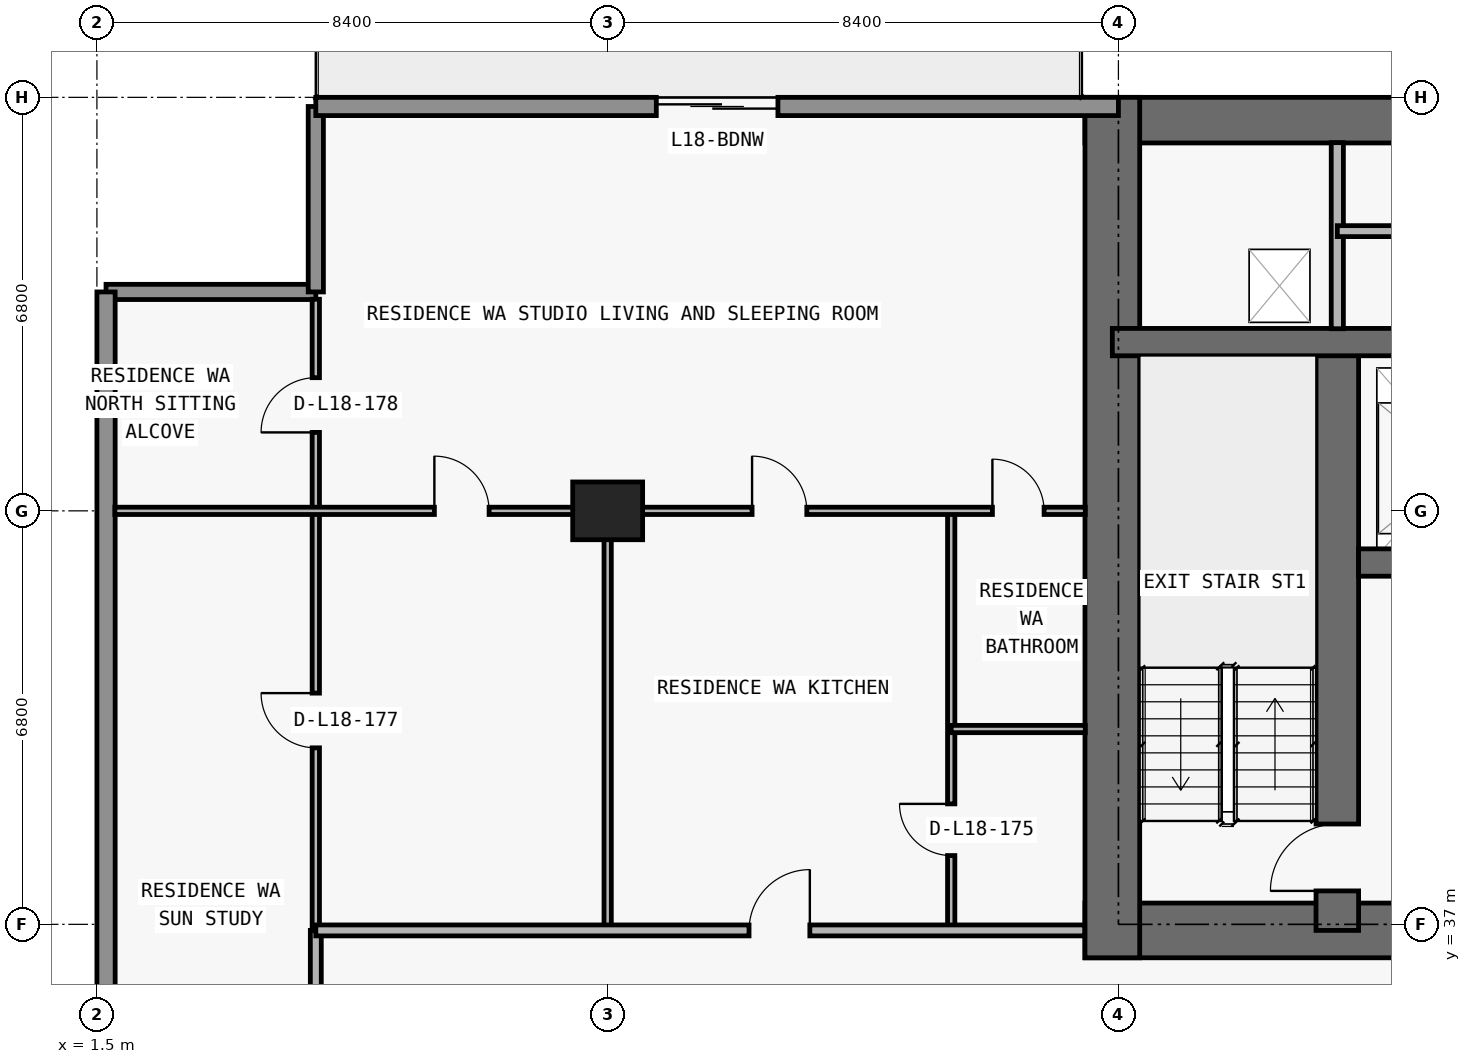
"""IFC4 building model, lengths in metres.
Left out: names, types, materials, properties, quantities, classifications, styles, units other than length and angle.
Written with IfcOpenShell. Run it as: python <this file> out.ifc"""

import sys

from ifc_helpers import new_model, si_unit, direction, frame, frame_2d, origin, origin_2d, place, context, subcontext, project, spatial, rectangle, extrude, element, fill, save


model = new_model("IFC4")
c1 = context("Model", 3, precision=1e-05, world=origin(), true_north=direction((0.0, 1.0)))
c2 = subcontext(c1, "Body", "Model", "MODEL_VIEW")
j1 = project(units=[si_unit("LENGTHUNIT", "METRE"), si_unit("PLANEANGLEUNIT", "RADIAN")], contexts=[c1])
p1 = place(None, origin())
s1 = spatial("IfcSite", under=j1, at=p1, CompositionType="ELEMENT")
p2 = place(p1, origin())
s2 = spatial("IfcBuilding", under=s1, at=p2, CompositionType="ELEMENT")
p3 = place(p2, frame((0.0, 0.0, 69.6)))
s3 = spatial("IfcBuildingStorey", under=s2, at=p3, CompositionType="ELEMENT", Elevation=69.6)
p4 = place(p3, frame((9.9, 43.8, 0.0), z_axis=(0.0, 0.0, 1.0), x_axis=(1.0, 0.0, 0.0)))
e1 = element("IfcColumn", 1, at=p4, inside=s3, PredefinedType="COLUMN", context=c2, shape_type="SweptSolid", body=[
    extrude(rectangle(XDim=1.15, YDim=0.95, at=origin_2d()), origin(), (0.0, 0.0, 1.0), 3.05),
])
p5 = place(p3, frame((17.75, 36.9, 0.0), z_axis=(0.0, 0.0, 1.0), x_axis=(1.0, 0.0, 0.0)))
e2 = element("IfcWall", 2, at=p5, inside=s3, PredefinedType="SHEAR", context=c2, shape_type="SweptSolid", body=[
    extrude(rectangle(XDim=42.3, YDim=0.9, at=frame_2d((21.15, 0.0))), origin(), (0.0, 0.0, 1.0), 3.05),
])
p6 = place(p5, frame((14.55, 0.0, 0.0)))
e3 = element("IfcOpeningElement", 3, at=p6, cuts=e2, PredefinedType="OPENING", context=c2, shape_type="SweptSolid", body=[
    extrude(rectangle(XDim=1.1, YDim=2.15, at=frame_2d((0.55, 1.075))), frame((0.0, 0.46, 0.0), z_axis=(0.0, -1.0, 0.0), x_axis=(1.0, 0.0, 0.0)), (0.0, 0.0, 1.0), 0.92),
])
p7 = place(p5, frame((6.4, 0.0, 0.0)))
e4 = element("IfcOpeningElement", 4, at=p7, cuts=e2, PredefinedType="OPENING", context=c2, shape_type="SweptSolid", body=[
    extrude(rectangle(XDim=1.05, YDim=2.15, at=frame_2d((0.525, 1.075))), frame((0.0, 0.46, 0.0), z_axis=(0.0, -1.0, 0.0), x_axis=(1.0, 0.0, 0.0)), (0.0, 0.0, 1.0), 0.92),
])
p8 = place(p5, frame((34.9, 0.0, 0.0)))
e5 = element("IfcOpeningElement", 5, at=p8, cuts=e2, PredefinedType="OPENING", context=c2, shape_type="SweptSolid", body=[
    extrude(rectangle(XDim=1.05, YDim=2.15, at=frame_2d((0.525, 1.075))), frame((0.0, 0.46, 0.0), z_axis=(0.0, -1.0, 0.0), x_axis=(1.0, 0.0, 0.0)), (0.0, 0.0, 1.0), 0.92),
])
p9 = place(p5, frame((11.012, 0.0, 0.0)))
e6 = element("IfcOpeningElement", 6, at=p9, cuts=e2, PredefinedType="OPENING", context=c2, shape_type="SweptSolid", body=[
    extrude(rectangle(XDim=1.05, YDim=2.15, at=frame_2d((0.525, 1.075))), frame((0.0, 0.46, 0.0), z_axis=(0.0, -1.0, 0.0), x_axis=(1.0, 0.0, 0.0)), (0.0, 0.0, 1.0), 0.92),
])
p10 = place(p5, frame((24.25, 0.0, 0.0)))
e7 = element("IfcOpeningElement", 7, at=p10, cuts=e2, PredefinedType="OPENING", context=c2, shape_type="SweptSolid", body=[
    extrude(rectangle(XDim=1.05, YDim=2.15, at=frame_2d((0.525, 1.075))), frame((0.0, 0.46, 0.0), z_axis=(0.0, -1.0, 0.0), x_axis=(1.0, 0.0, 0.0)), (0.0, 0.0, 1.0), 0.92),
])
p11 = place(p3, frame((17.75, 50.225, 0.0), z_axis=(0.0, 0.0, 1.0), x_axis=(1.0, 0.0, 0.0)))
e8 = element("IfcWall", 8, at=p11, inside=s3, PredefinedType="SHEAR", context=c2, shape_type="SweptSolid", body=[
    extrude(rectangle(XDim=42.3, YDim=0.75, at=frame_2d((21.15, 0.0))), origin(), (0.0, 0.0, 1.0), 3.05),
])
p12 = place(p3, frame((18.2, 36.45, 0.0), z_axis=(0.0, 0.0, 1.0), x_axis=(0.0, 1.0, 0.0)))
e9 = element("IfcWall", 9, at=p12, inside=s3, PredefinedType="SHEAR", context=c2, shape_type="SweptSolid", body=[
    extrude(rectangle(XDim=14.15, YDim=0.9, at=frame_2d((7.075, 0.0))), origin(), (0.0, 0.0, 1.0), 3.05),
])
p13 = place(p3, frame((21.9, 36.9, 0.0), z_axis=(0.0, 0.0, 1.0), x_axis=(0.0, 1.0, 0.0)))
e10 = element("IfcWall", 10, at=p13, inside=s3, PredefinedType="SHEAR", context=c2, shape_type="SweptSolid", body=[
    extrude(rectangle(XDim=9.675, YDim=0.7, at=frame_2d((4.837, 0.0))), origin(), (0.0, 0.0, 1.0), 3.05),
])
p14 = place(p13, frame((0.65, 0.0, 0.0)))
e11 = element("IfcOpeningElement", 11, at=p14, cuts=e10, PredefinedType="OPENING", context=c2, shape_type="SweptSolid", body=[
    extrude(rectangle(XDim=1.1, YDim=2.15, at=frame_2d((0.55, 1.075))), frame((0.0, 0.36, 0.0), z_axis=(0.0, -1.0, 0.0), x_axis=(1.0, 0.0, 0.0)), (0.0, 0.0, 1.0), 0.72),
])
p15 = place(p3, frame((22.25, 42.95, 0.0), z_axis=(0.0, 0.0, 1.0), x_axis=(1.0, 0.0, 0.0)))
e12 = element("IfcWall", 12, at=p15, inside=s3, PredefinedType="SHEAR", context=c2, shape_type="SweptSolid", body=[
    extrude(rectangle(XDim=33.3, YDim=0.45, at=frame_2d((16.65, 0.0))), origin(), (0.0, 0.0, 1.0), 3.05),
])
p16 = place(p15, frame((1.05, 0.0, 0.0)))
e13 = element("IfcOpeningElement", 13, at=p16, cuts=e12, PredefinedType="OPENING", context=c2, shape_type="SweptSolid", body=[
    extrude(rectangle(XDim=1.2, YDim=2.2, at=frame_2d((0.6, 1.1))), frame((0.0, 0.235, 0.0), z_axis=(0.0, -1.0, 0.0), x_axis=(1.0, 0.0, 0.0)), (0.0, 0.0, 1.0), 0.47),
])
p17 = place(p15, frame((31.05, 0.0, 0.0)))
e14 = element("IfcOpeningElement", 14, at=p17, cuts=e12, PredefinedType="OPENING", context=c2, shape_type="SweptSolid", body=[
    extrude(rectangle(XDim=1.2, YDim=2.2, at=frame_2d((0.6, 1.1))), frame((0.0, 0.235, 0.0), z_axis=(0.0, -1.0, 0.0), x_axis=(1.0, 0.0, 0.0)), (0.0, 0.0, 1.0), 0.47),
])
p18 = place(p15, frame((13.5, 0.0, 0.0)))
e15 = element("IfcOpeningElement", 15, at=p18, cuts=e12, PredefinedType="OPENING", context=c2, shape_type="SweptSolid", body=[
    extrude(rectangle(XDim=1.1, YDim=2.2, at=frame_2d((0.55, 1.1))), frame((0.0, 0.235, 0.0), z_axis=(0.0, -1.0, 0.0), x_axis=(1.0, 0.0, 0.0)), (0.0, 0.0, 1.0), 0.47),
])
p19 = place(p15, frame((16.1, 0.0, 0.0)))
e16 = element("IfcOpeningElement", 16, at=p19, cuts=e12, PredefinedType="OPENING", context=c2, shape_type="SweptSolid", body=[
    extrude(rectangle(XDim=1.1, YDim=2.2, at=frame_2d((0.55, 1.1))), frame((0.0, 0.235, 0.0), z_axis=(0.0, -1.0, 0.0), x_axis=(1.0, 0.0, 0.0)), (0.0, 0.0, 1.0), 0.47),
])
p20 = place(p15, frame((18.7, 0.0, 0.0)))
e17 = element("IfcOpeningElement", 17, at=p20, cuts=e12, PredefinedType="OPENING", context=c2, shape_type="SweptSolid", body=[
    extrude(rectangle(XDim=1.1, YDim=2.2, at=frame_2d((0.55, 1.1))), frame((0.0, 0.235, 0.0), z_axis=(0.0, -1.0, 0.0), x_axis=(1.0, 0.0, 0.0)), (0.0, 0.0, 1.0), 0.47),
])
p21 = place(p15, frame((3.625, 0.0, 0.0)))
e18 = element("IfcOpeningElement", 18, at=p21, cuts=e12, PredefinedType="OPENING", context=c2, shape_type="SweptSolid", body=[
    extrude(rectangle(XDim=1.05, YDim=2.15, at=frame_2d((0.525, 1.075))), frame((0.0, 0.235, 0.0), z_axis=(0.0, -1.0, 0.0), x_axis=(1.0, 0.0, 0.0)), (0.0, 0.0, 1.0), 0.47),
])
p22 = place(p15, frame((28.675, 0.0, 0.0)))
e19 = element("IfcOpeningElement", 19, at=p22, cuts=e12, PredefinedType="OPENING", context=c2, shape_type="SweptSolid", body=[
    extrude(rectangle(XDim=1.05, YDim=2.15, at=frame_2d((0.525, 1.075))), frame((0.0, 0.235, 0.0), z_axis=(0.0, -1.0, 0.0), x_axis=(1.0, 0.0, 0.0)), (0.0, 0.0, 1.0), 0.47),
])
p23 = place(p3, frame((18.2, 46.575, 0.0), z_axis=(0.0, 0.0, 1.0), x_axis=(1.0, 0.0, 0.0)))
e20 = element("IfcWall", 20, at=p23, inside=s3, PredefinedType="SHEAR", context=c2, shape_type="SweptSolid", body=[
    extrude(rectangle(XDim=41.4, YDim=0.45, at=frame_2d((20.7, 0.0))), origin(), (0.0, 0.0, 1.0), 3.05),
])
p24 = place(p23, frame((7.675, 0.0, 0.0)))
e21 = element("IfcOpeningElement", 21, at=p24, cuts=e20, PredefinedType="OPENING", context=c2, shape_type="SweptSolid", body=[
    extrude(rectangle(XDim=1.05, YDim=2.15, at=frame_2d((0.525, 1.075))), frame((0.0, 0.235, 0.0), z_axis=(0.0, -1.0, 0.0), x_axis=(1.0, 0.0, 0.0)), (0.0, 0.0, 1.0), 0.47),
])
p25 = place(p23, frame((32.725, 0.0, 0.0)))
e22 = element("IfcOpeningElement", 22, at=p25, cuts=e20, PredefinedType="OPENING", context=c2, shape_type="SweptSolid", body=[
    extrude(rectangle(XDim=1.05, YDim=2.15, at=frame_2d((0.525, 1.075))), frame((0.0, 0.235, 0.0), z_axis=(0.0, -1.0, 0.0), x_axis=(1.0, 0.0, 0.0)), (0.0, 0.0, 1.0), 0.47),
])
p26 = place(p3, frame((1.65, 47.4, 0.0), z_axis=(0.0, 0.0, 1.0), x_axis=(1.0, 0.0, 0.0)))
e23 = element("IfcWall", 23, at=p26, inside=s3, PredefinedType="ELEMENTEDWALL", context=c2, shape_type="SweptSolid", body=[
    extrude(rectangle(XDim=3.45, YDim=0.25, at=frame_2d((1.725, 0.0))), origin(), (0.0, 0.0, 1.0), 3.05),
])
p27 = place(p3, frame((5.1, 47.4, 0.0), z_axis=(0.0, 0.0, 1.0), x_axis=(0.0, 1.0, 0.0)))
e24 = element("IfcWall", 24, at=p27, inside=s3, PredefinedType="ELEMENTEDWALL", context=c2, shape_type="SweptSolid", body=[
    extrude(rectangle(XDim=3.05, YDim=0.25, at=frame_2d((1.525, 0.0))), origin(), (0.0, 0.0, 1.0), 3.05),
])
p28 = place(p3, frame((1.65, 26.8, 0.0), z_axis=(0.0, 0.0, 1.0), x_axis=(0.0, 1.0, 0.0)))
e25 = element("IfcWall", 25, at=p28, inside=s3, PredefinedType="STANDARD", context=c2, shape_type="SweptSolid", body=[
    extrude(rectangle(XDim=20.6, YDim=0.3, at=frame_2d((10.3, 0.0))), origin(), (0.0, 0.0, 1.0), 3.05),
])
p29 = place(p3, frame((5.1, 50.45, 0.0), z_axis=(0.0, 0.0, 1.0), x_axis=(1.0, 0.0, 0.0)))
e26 = element("IfcWall", 26, at=p29, inside=s3, PredefinedType="STANDARD", context=c2, shape_type="SweptSolid", body=[
    extrude(rectangle(XDim=13.2, YDim=0.3, at=frame_2d((6.6, 0.0))), origin(), (0.0, 0.0, 1.0), 3.05),
])
p30 = place(p29, frame((5.6, 0.0, 0.0)))
e27 = element("IfcOpeningElement", 27, at=p30, cuts=e26, PredefinedType="OPENING", context=c2, shape_type="SweptSolid", body=[
    extrude(rectangle(XDim=2.0, YDim=2.3, at=frame_2d((1.0, 1.15))), frame((0.0, 0.16, 0.0), z_axis=(0.0, -1.0, 0.0), x_axis=(1.0, 0.0, 0.0)), (0.0, 0.0, 1.0), 0.32),
])
p31 = place(p3, frame((5.1, 34.705, 0.0), z_axis=(0.0, 0.0, 1.0), x_axis=(0.0, 1.0, 0.0)))
e28 = element("IfcWall", 28, at=p31, inside=s3, PredefinedType="PARTITIONING", context=c2, shape_type="SweptSolid", body=[
    extrude(rectangle(XDim=2.195, YDim=0.18, at=frame_2d((1.097, 0.0))), origin(), (0.0, 0.0, 1.0), 3.05),
])
p32 = place(p3, frame((5.1, 36.905, 0.0), z_axis=(0.0, 0.0, 1.0), x_axis=(0.0, 1.0, 0.0)))
e29 = element("IfcWall", 29, at=p32, inside=s3, PredefinedType="PARTITIONING", context=c2, shape_type="SweptSolid", body=[
    extrude(rectangle(XDim=10.375, YDim=0.12, at=frame_2d((5.188, 0.0))), origin(), (0.0, 0.0, 1.0), 3.05),
])
p33 = place(p32, frame((2.998, 0.0, 0.0)))
e30 = element("IfcOpeningElement", 30, at=p33, cuts=e29, PredefinedType="OPENING", context=c2, shape_type="SweptSolid", body=[
    extrude(rectangle(XDim=0.9, YDim=2.15, at=frame_2d((0.45, 1.075))), frame((0.0, 0.07, 0.0), z_axis=(0.0, -1.0, 0.0), x_axis=(1.0, 0.0, 0.0)), (0.0, 0.0, 1.0), 0.14),
])
p34 = place(p32, frame((8.185, 0.0, 0.0)))
e31 = element("IfcOpeningElement", 31, at=p34, cuts=e29, PredefinedType="OPENING", context=c2, shape_type="SweptSolid", body=[
    extrude(rectangle(XDim=0.9, YDim=2.15, at=frame_2d((0.45, 1.075))), frame((0.0, 0.07, 0.0), z_axis=(0.0, -1.0, 0.0), x_axis=(1.0, 0.0, 0.0)), (0.0, 0.0, 1.0), 0.14),
])
p35 = place(p3, frame((9.9, 36.9, 0.0), z_axis=(0.0, 0.0, 1.0), x_axis=(0.0, 1.0, 0.0)))
e32 = element("IfcWall", 32, at=p35, inside=s3, PredefinedType="PARTITIONING", context=c2, shape_type="SweptSolid", body=[
    extrude(rectangle(XDim=6.9, YDim=0.12, at=frame_2d((3.45, 0.0))), origin(), (0.0, 0.0, 1.0), 2.11),
])
p36 = place(p3, frame((15.55, 36.9, 0.0), z_axis=(0.0, 0.0, 1.0), x_axis=(0.0, 1.0, 0.0)))
e33 = element("IfcWall", 33, at=p36, inside=s3, PredefinedType="PARTITIONING", context=c2, shape_type="SweptSolid", body=[
    extrude(rectangle(XDim=6.9, YDim=0.12, at=frame_2d((3.45, 0.0))), origin(), (0.0, 0.0, 1.0), 3.05),
])
p37 = place(p36, frame((1.231, 0.0, 0.0)))
e34 = element("IfcOpeningElement", 34, at=p37, cuts=e33, PredefinedType="OPENING", context=c2, shape_type="SweptSolid", body=[
    extrude(rectangle(XDim=0.85, YDim=2.1, at=frame_2d((0.425, 1.05))), frame((0.0, 0.07, 0.0), z_axis=(0.0, -1.0, 0.0), x_axis=(1.0, 0.0, 0.0)), (0.0, 0.0, 1.0), 0.14),
])
p38 = place(p3, frame((21.9, 46.795, 0.0), z_axis=(0.0, 0.0, 1.0), x_axis=(0.0, 1.0, 0.0)))
e35 = element("IfcWall", 35, at=p38, inside=s3, PredefinedType="PARTITIONING", context=c2, shape_type="SweptSolid", body=[
    extrude(rectangle(XDim=3.06, YDim=0.2, at=frame_2d((1.53, 0.0))), origin(), (0.0, 0.0, 1.0), 3.05),
])
p39 = place(p3, frame((5.1, 36.9, 0.0), z_axis=(0.0, 0.0, 1.0), x_axis=(1.0, 0.0, 0.0)))
e36 = element("IfcWall", 36, at=p39, inside=s3, PredefinedType="PARTITIONING", context=c2, shape_type="SweptSolid", body=[
    extrude(rectangle(XDim=12.645, YDim=0.18, at=frame_2d((6.323, 0.0))), origin(), (0.0, 0.0, 1.0), 3.05),
])
p40 = place(p39, frame((7.125, 0.0, 0.0)))
e37 = element("IfcOpeningElement", 37, at=p40, cuts=e36, PredefinedType="OPENING", context=c2, shape_type="SweptSolid", body=[
    extrude(rectangle(XDim=1.0, YDim=2.2, at=frame_2d((0.5, 1.1))), frame((0.0, 0.1, 0.0), z_axis=(0.0, -1.0, 0.0), x_axis=(1.0, 0.0, 0.0)), (0.0, 0.0, 1.0), 0.2),
])
p41 = place(p3, frame((15.55, 40.212, 0.0), z_axis=(0.0, 0.0, 1.0), x_axis=(1.0, 0.0, 0.0)))
e38 = element("IfcWall", 38, at=p41, inside=s3, PredefinedType="PARTITIONING", context=c2, shape_type="SweptSolid", body=[
    extrude(rectangle(XDim=2.205, YDim=0.12, at=frame_2d((1.103, 0.0))), origin(), (0.0, 0.0, 1.0), 3.05),
])
p42 = place(p3, frame((1.795, 43.8, 0.0), z_axis=(0.0, 0.0, 1.0), x_axis=(1.0, 0.0, 0.0)))
e39 = element("IfcWall", 39, at=p42, inside=s3, PredefinedType="PARTITIONING", context=c2, shape_type="SweptSolid", body=[
    extrude(rectangle(XDim=15.96, YDim=0.12, at=frame_2d((7.98, 0.0))), origin(), (0.0, 0.0, 1.0), 2.339),
])
p43 = place(p42, frame((5.255, 0.0, 0.0)))
e40 = element("IfcOpeningElement", 40, at=p43, cuts=e39, PredefinedType="OPENING", context=c2, shape_type="SweptSolid", body=[
    extrude(rectangle(XDim=0.9, YDim=2.15, at=frame_2d((0.45, 1.075))), frame((0.0, 0.07, 0.0), z_axis=(0.0, -1.0, 0.0), x_axis=(1.0, 0.0, 0.0)), (0.0, 0.0, 1.0), 0.14),
])
p44 = place(p42, frame((10.48, 0.0, 0.0)))
e41 = element("IfcOpeningElement", 41, at=p44, cuts=e39, PredefinedType="OPENING", context=c2, shape_type="SweptSolid", body=[
    extrude(rectangle(XDim=0.9, YDim=2.15, at=frame_2d((0.45, 1.075))), frame((0.0, 0.07, 0.0), z_axis=(0.0, -1.0, 0.0), x_axis=(1.0, 0.0, 0.0)), (0.0, 0.0, 1.0), 0.14),
])
p45 = place(p42, frame((14.433, 0.0, 0.0)))
e42 = element("IfcOpeningElement", 42, at=p45, cuts=e39, PredefinedType="OPENING", context=c2, shape_type="SweptSolid", body=[
    extrude(rectangle(XDim=0.85, YDim=2.1, at=frame_2d((0.425, 1.05))), frame((0.0, 0.07, 0.0), z_axis=(0.0, -1.0, 0.0), x_axis=(1.0, 0.0, 0.0)), (0.0, 0.0, 1.0), 0.14),
])
p46 = place(p3, frame((21.9, 48.4, 0.0), z_axis=(0.0, 0.0, 1.0), x_axis=(1.0, 0.0, 0.0)))
e43 = element("IfcWall", 43, at=p46, inside=s3, PredefinedType="PARTITIONING", context=c2, shape_type="SweptSolid", body=[
    extrude(rectangle(XDim=34.0, YDim=0.18, at=frame_2d((17.0, 0.0))), origin(), (0.0, 0.0, 1.0), 3.05),
])
p47 = place(p46, frame((8.0, 0.0, 0.0)))
e44 = element("IfcOpeningElement", 44, at=p47, cuts=e43, PredefinedType="OPENING", context=c2, shape_type="SweptSolid", body=[
    extrude(rectangle(XDim=1.0, YDim=2.2, at=frame_2d((0.5, 1.1))), frame((0.0, 0.1, 0.0), z_axis=(0.0, -1.0, 0.0), x_axis=(1.0, 0.0, 0.0)), (0.0, 0.0, 1.0), 0.2),
])
p48 = place(p46, frame((25.0, 0.0, 0.0)))
e45 = element("IfcOpeningElement", 45, at=p48, cuts=e43, PredefinedType="OPENING", context=c2, shape_type="SweptSolid", body=[
    extrude(rectangle(XDim=1.0, YDim=2.2, at=frame_2d((0.5, 1.1))), frame((0.0, 0.1, 0.0), z_axis=(0.0, -1.0, 0.0), x_axis=(1.0, 0.0, 0.0)), (0.0, 0.0, 1.0), 0.2),
])
p49 = place(p30, origin())
e46 = element("IfcDoor", 46, at=p49, inside=s3, OperationType="DOUBLE_DOOR_SLIDING", PredefinedType="DOOR", context=c2, shape_type="SweptSolid", body=[
    extrude(rectangle(XDim=2.0, YDim=2.3, at=frame_2d((1.0, 1.15))), frame((0.0, 0.025, 0.0), z_axis=(0.0, -1.0, 0.0), x_axis=(1.0, 0.0, 0.0)), (0.0, 0.0, 1.0), 0.05),
])
fill(e27, e46)
p50 = place(p14, origin())
e47 = element("IfcDoor", 47, at=p50, inside=s3, OperationType="SINGLE_SWING_LEFT", PredefinedType="DOOR", context=c2, shape_type="SweptSolid", body=[
    extrude(rectangle(XDim=1.1, YDim=2.15, at=frame_2d((0.55, 1.075))), frame((0.0, 0.025, 0.0), z_axis=(0.0, -1.0, 0.0), x_axis=(1.0, 0.0, 0.0)), (0.0, 0.0, 1.0), 0.05),
])
fill(e11, e47)
p51 = place(p43, origin())
e48 = element("IfcDoor", 48, at=p51, inside=s3, OperationType="SINGLE_SWING_LEFT", PredefinedType="DOOR", context=c2, shape_type="SweptSolid", body=[
    extrude(rectangle(XDim=0.9, YDim=2.15, at=frame_2d((0.45, 1.075))), frame((0.0, 0.025, 0.0), z_axis=(0.0, -1.0, 0.0), x_axis=(1.0, 0.0, 0.0)), (0.0, 0.0, 1.0), 0.05),
])
fill(e40, e48)
p52 = place(p40, origin())
e49 = element("IfcDoor", 49, at=p52, inside=s3, OperationType="SINGLE_SWING_RIGHT", PredefinedType="DOOR", context=c2, shape_type="SweptSolid", body=[
    extrude(rectangle(XDim=1.0, YDim=2.2, at=frame_2d((0.5, 1.1))), frame((0.0, 0.025, 0.0), z_axis=(0.0, -1.0, 0.0), x_axis=(1.0, 0.0, 0.0)), (0.0, 0.0, 1.0), 0.05),
])
fill(e37, e49)
p53 = place(p44, origin())
e50 = element("IfcDoor", 50, at=p53, inside=s3, OperationType="SINGLE_SWING_LEFT", PredefinedType="DOOR", context=c2, shape_type="SweptSolid", body=[
    extrude(rectangle(XDim=0.9, YDim=2.15, at=frame_2d((0.45, 1.075))), frame((0.0, 0.025, 0.0), z_axis=(0.0, -1.0, 0.0), x_axis=(1.0, 0.0, 0.0)), (0.0, 0.0, 1.0), 0.05),
])
fill(e41, e50)
p54 = place(p37, origin())
e51 = element("IfcDoor", 51, at=p54, inside=s3, OperationType="SINGLE_SWING_RIGHT", PredefinedType="DOOR", context=c2, shape_type="SweptSolid", body=[
    extrude(rectangle(XDim=0.85, YDim=2.1, at=frame_2d((0.425, 1.05))), frame((0.0, 0.025, 0.0), z_axis=(0.0, -1.0, 0.0), x_axis=(1.0, 0.0, 0.0)), (0.0, 0.0, 1.0), 0.05),
])
fill(e34, e51)
p55 = place(p45, origin())
e52 = element("IfcDoor", 52, at=p55, inside=s3, OperationType="SINGLE_SWING_LEFT", PredefinedType="DOOR", context=c2, shape_type="SweptSolid", body=[
    extrude(rectangle(XDim=0.85, YDim=2.1, at=frame_2d((0.425, 1.05))), frame((0.0, 0.025, 0.0), z_axis=(0.0, -1.0, 0.0), x_axis=(1.0, 0.0, 0.0)), (0.0, 0.0, 1.0), 0.05),
])
fill(e42, e52)
p56 = place(p33, origin())
e53 = element("IfcDoor", 53, at=p56, inside=s3, OperationType="SINGLE_SWING_RIGHT", PredefinedType="DOOR", context=c2, shape_type="SweptSolid", body=[
    extrude(rectangle(XDim=0.9, YDim=2.15, at=frame_2d((0.45, 1.075))), frame((0.0, 0.025, 0.0), z_axis=(0.0, -1.0, 0.0), x_axis=(1.0, 0.0, 0.0)), (0.0, 0.0, 1.0), 0.05),
])
fill(e30, e53)
p57 = place(p34, origin())
e54 = element("IfcDoor", 54, at=p57, inside=s3, OperationType="SINGLE_SWING_LEFT", PredefinedType="DOOR", context=c2, shape_type="SweptSolid", body=[
    extrude(rectangle(XDim=0.9, YDim=2.15, at=frame_2d((0.45, 1.075))), frame((0.0, 0.025, 0.0), z_axis=(0.0, -1.0, 0.0), x_axis=(1.0, 0.0, 0.0)), (0.0, 0.0, 1.0), 0.05),
])
fill(e31, e54)
save(model, sys.argv[1])
